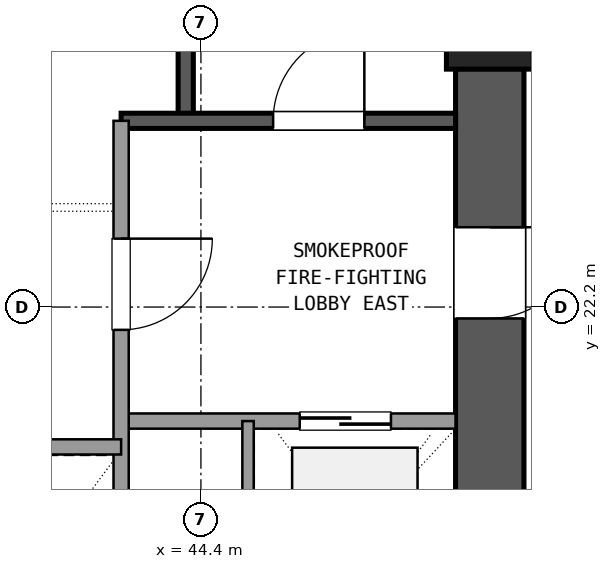
"""IFC4 building model, lengths in metres.
Left out: names, types, materials, properties, quantities, classifications, styles, units other than length and angle.
Written with IfcOpenShell. Run it as: python <this file> out.ifc"""

import sys

from ifc_helpers import new_model, si_unit, direction, frame, frame_2d, origin, origin_2d, place, context, subcontext, project, spatial, rectangle, extrude, element, fill, save


model = new_model("IFC4")
c1 = context("Model", 3, precision=1e-05, world=origin(), true_north=direction((0.0, 1.0)))
c2 = subcontext(c1, "Body", "Model", "MODEL_VIEW")
j1 = project(units=[si_unit("LENGTHUNIT", "METRE"), si_unit("PLANEANGLEUNIT", "RADIAN")], contexts=[c1])
p1 = place(None, origin())
s1 = spatial("IfcSite", under=j1, at=p1, CompositionType="ELEMENT")
p2 = place(p1, origin())
s2 = spatial("IfcBuilding", under=s1, at=p2, CompositionType="ELEMENT")
p3 = place(p2, frame((0.0, 0.0, 38.34)))
s3 = spatial("IfcBuildingStorey", under=s2, at=p3, CompositionType="ELEMENT", Elevation=38.34)
p4 = place(p3, frame((48.2, 25.9, 0.0), z_axis=(0.0, 0.0, 1.0), x_axis=(1.0, 0.0, 0.0)))
e1 = element("IfcColumn", 1, at=p4, inside=s3, PredefinedType="COLUMN", context=c2, shape_type="SweptSolid", body=[
    extrude(rectangle(XDim=1.14, YDim=1.14, at=origin_2d()), origin(), (0.0, 0.0, 1.0), 3.6),
])
p5 = place(p3, frame((48.2, 17.865, 0.0), z_axis=(0.0, 0.0, 1.0), x_axis=(0.0, 1.0, 0.0)))
e2 = element("IfcWall", 2, at=p5, inside=s3, PredefinedType="SHEAR", context=c2, shape_type="SweptSolid", body=[
    extrude(rectangle(XDim=7.47, YDim=0.9, at=frame_2d((3.735, 0.0))), origin(), (0.0, 0.0, 1.0), 3.32),
])
p6 = place(p5, frame((4.185, 0.0, 0.0)))
e3 = element("IfcOpeningElement", 3, at=p6, cuts=e2, PredefinedType="OPENING", context=c2, shape_type="SweptSolid", body=[
    extrude(rectangle(XDim=1.2, YDim=2.15, at=frame_2d((0.6, 1.075))), frame((0.0, 0.46, 0.0), z_axis=(0.0, -1.0, 0.0), x_axis=(1.0, 0.0, 0.0)), (0.0, 0.0, 1.0), 0.92),
])
p7 = place(p3, frame((44.2, 24.65, 0.0), z_axis=(0.0, 0.0, 1.0), x_axis=(0.0, 1.0, 0.0)))
e4 = element("IfcWall", 4, at=p7, inside=s3, PredefinedType="SHEAR", context=c2, shape_type="SweptSolid", body=[
    extrude(rectangle(XDim=9.4, YDim=0.2, at=frame_2d((4.7, 0.0))), origin(), (0.0, 0.0, 1.0), 3.32),
])
p8 = place(p3, frame((43.35, 24.65, 0.0), z_axis=(0.0, 0.0, 1.0), x_axis=(1.0, 0.0, 0.0)))
e5 = element("IfcWall", 5, at=p8, inside=s3, PredefinedType="SHEAR", context=c2, shape_type="SweptSolid", body=[
    extrude(rectangle(XDim=4.4, YDim=0.2, at=frame_2d((2.2, 0.0))), origin(), (0.0, 0.0, 1.0), 3.32),
])
p9 = place(p8, frame((2.0, 0.0, 0.0)))
e6 = element("IfcOpeningElement", 6, at=p9, cuts=e5, PredefinedType="OPENING", context=c2, shape_type="SweptSolid", body=[
    extrude(rectangle(XDim=1.2, YDim=2.15, at=frame_2d((0.6, 1.075))), frame((0.0, 0.11, 0.0), z_axis=(0.0, -1.0, 0.0), x_axis=(1.0, 0.0, 0.0)), (0.0, 0.0, 1.0), 0.22),
])
p10 = place(p3, frame((43.35, 20.7, 0.0), z_axis=(0.0, 0.0, 1.0), x_axis=(1.0, 0.0, 0.0)))
e7 = element("IfcWall", 7, at=p10, inside=s3, PredefinedType="SOLIDWALL", context=c2, shape_type="SweptSolid", body=[
    extrude(rectangle(XDim=4.4, YDim=0.2, at=frame_2d((2.2, 0.0))), origin(), (0.0, 0.0, 1.0), 2.61),
])
p11 = place(p10, frame((2.35, 0.0, 0.0)))
e8 = element("IfcOpeningElement", 8, at=p11, cuts=e7, PredefinedType="OPENING", context=c2, shape_type="SweptSolid", body=[
    extrude(rectangle(XDim=1.2, YDim=2.15, at=frame_2d((0.6, 1.075))), frame((0.0, 0.11, 0.0), z_axis=(0.0, -1.0, 0.0), x_axis=(1.0, 0.0, 0.0)), (0.0, 0.0, 1.0), 0.22),
])
p12 = place(p3, frame((43.35, 17.75, 0.0), z_axis=(0.0, 0.0, 1.0), x_axis=(0.0, 1.0, 0.0)))
e9 = element("IfcWall", 9, at=p12, inside=s3, PredefinedType="SOLIDWALL", context=c2, shape_type="SweptSolid", body=[
    extrude(rectangle(XDim=6.9, YDim=0.2, at=frame_2d((3.45, 0.0))), origin(), (0.0, 0.0, 1.0), 2.61),
])
p13 = place(p12, frame((4.15, 0.0, 0.0)))
e10 = element("IfcOpeningElement", 10, at=p13, cuts=e9, PredefinedType="OPENING", context=c2, shape_type="SweptSolid", body=[
    extrude(rectangle(XDim=1.2, YDim=2.15, at=frame_2d((0.6, 1.075))), frame((0.0, 0.11, 0.0), z_axis=(0.0, -1.0, 0.0), x_axis=(1.0, 0.0, 0.0)), (0.0, 0.0, 1.0), 0.22),
])
p14 = place(p3, frame((45.02, 17.75, 0.0), z_axis=(0.0, 0.0, 1.0), x_axis=(0.0, 1.0, 0.0)))
e11 = element("IfcWall", 11, at=p14, inside=s3, PredefinedType="PARTITIONING", context=c2, shape_type="SweptSolid", body=[
    extrude(rectangle(XDim=2.95, YDim=0.15, at=frame_2d((1.475, 0.0))), origin(), (0.0, 0.0, 1.0), 2.61),
])
p15 = place(p3, frame((37.25, 20.36, 0.0), z_axis=(0.0, 0.0, 1.0), x_axis=(1.0, 0.0, 0.0)))
e12 = element("IfcWall", 12, at=p15, inside=s3, PredefinedType="SOLIDWALL", context=c2, shape_type="SweptSolid", body=[
    extrude(rectangle(XDim=6.1, YDim=0.2, at=frame_2d((3.05, 0.0))), origin(), (0.0, 0.0, 1.0), 2.61),
])
p16 = place(p9, origin())
e13 = element("IfcDoor", 13, at=p16, inside=s3, OperationType="SINGLE_SWING_RIGHT", PredefinedType="DOOR", context=c2, shape_type="SweptSolid", body=[
    extrude(rectangle(XDim=1.2, YDim=2.15, at=frame_2d((0.6, 1.075))), frame((0.0, 0.025, 0.0), z_axis=(0.0, -1.0, 0.0), x_axis=(1.0, 0.0, 0.0)), (0.0, 0.0, 1.0), 0.05),
])
fill(e6, e13)
p17 = place(p11, origin())
e14 = element("IfcDoor", 14, at=p17, inside=s3, OperationType="SLIDING_TO_RIGHT", PredefinedType="DOOR", context=c2, shape_type="SweptSolid", body=[
    extrude(rectangle(XDim=1.2, YDim=2.15, at=frame_2d((0.6, 1.075))), frame((0.0, 0.025, 0.0), z_axis=(0.0, -1.0, 0.0), x_axis=(1.0, 0.0, 0.0)), (0.0, 0.0, 1.0), 0.05),
])
fill(e8, e14)
p18 = place(p13, frame((1.2, 0.0, 0.0), z_axis=(0.0, 0.0, 1.0), x_axis=(-1.0, 0.0, 0.0)))
e15 = element("IfcDoor", 15, at=p18, inside=s3, OperationType="SINGLE_SWING_RIGHT", PredefinedType="DOOR", context=c2, shape_type="SweptSolid", body=[
    extrude(rectangle(XDim=1.2, YDim=2.15, at=frame_2d((0.6, 1.075))), frame((0.0, 0.025, 0.0), z_axis=(0.0, -1.0, 0.0), x_axis=(1.0, 0.0, 0.0)), (0.0, 0.0, 1.0), 0.05),
])
fill(e10, e15)
p19 = place(p6, frame((1.2, 0.0, 0.0), z_axis=(0.0, 0.0, 1.0), x_axis=(-1.0, 0.0, 0.0)))
e16 = element("IfcDoor", 16, at=p19, inside=s3, OperationType="SINGLE_SWING_RIGHT", PredefinedType="DOOR", context=c2, shape_type="SweptSolid", body=[
    extrude(rectangle(XDim=1.2, YDim=2.15, at=frame_2d((0.6, 1.075))), frame((0.0, 0.025, 0.0), z_axis=(0.0, -1.0, 0.0), x_axis=(1.0, 0.0, 0.0)), (0.0, 0.0, 1.0), 0.05),
])
fill(e3, e16)
save(model, sys.argv[1])
